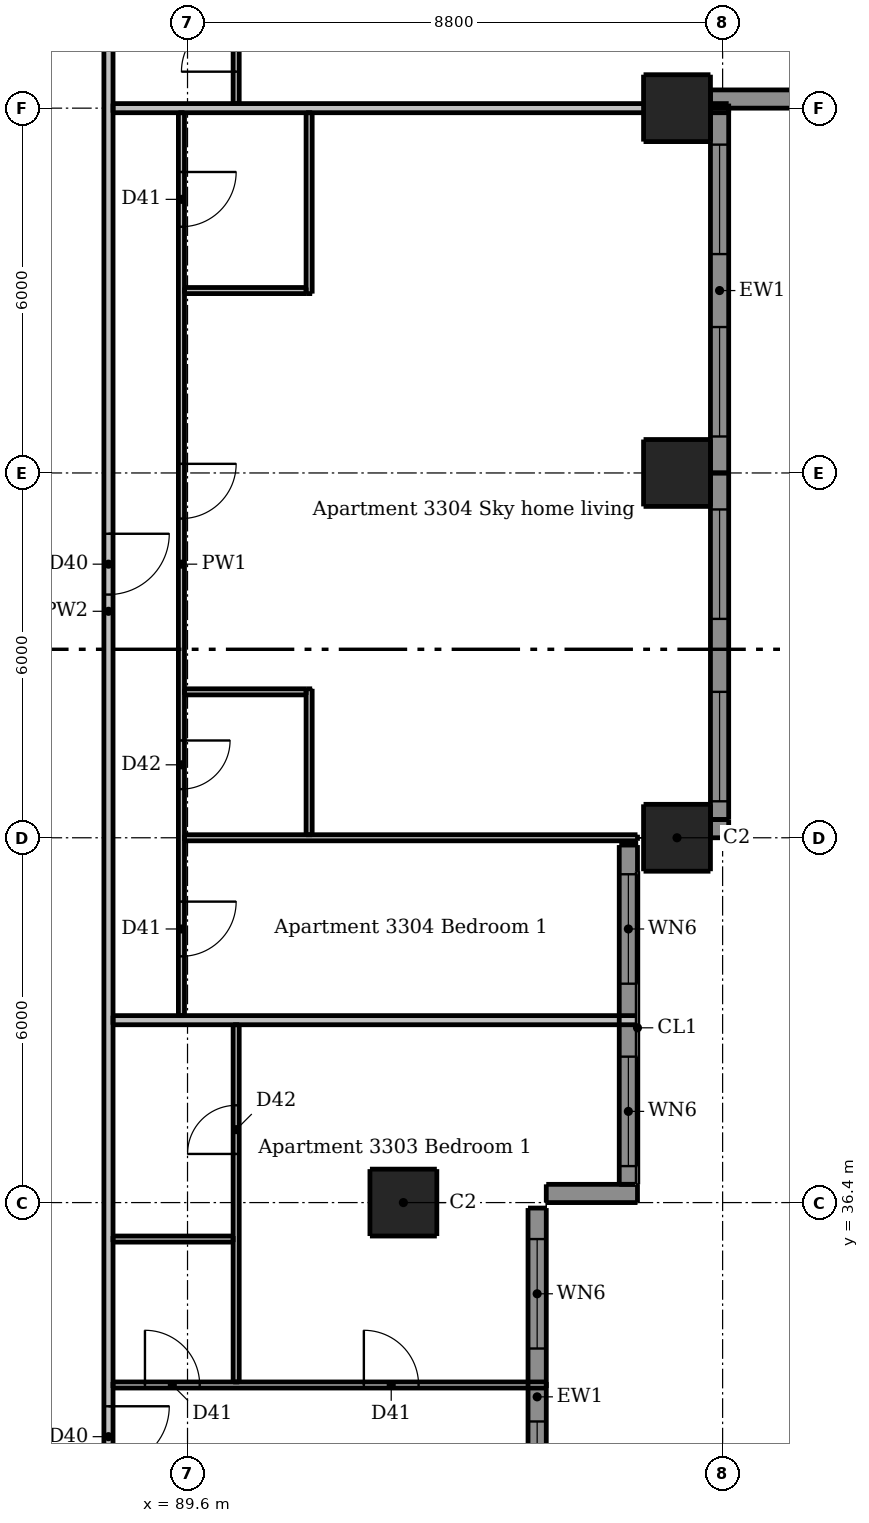
"""IFC4 building model, lengths in metres.
Left out: names, types, materials, properties, quantities, classifications, styles, units other than length and angle.
Written with IfcOpenShell. Run it as: python <this file> out.ifc"""

import sys

from ifc_helpers import new_model, si_unit, direction, frame, frame_2d, origin, origin_2d, place, context, subcontext, project, spatial, rectangle, extrude, element, fill, save


model = new_model("IFC4")
c1 = context("Model", 3, precision=1e-05, world=origin(), true_north=direction((0.0, 1.0)))
c2 = subcontext(c1, "Body", "Model", "MODEL_VIEW")
j1 = project(units=[si_unit("LENGTHUNIT", "METRE"), si_unit("PLANEANGLEUNIT", "RADIAN")], contexts=[c1])
p1 = place(None, origin())
s1 = spatial("IfcSite", under=j1, at=p1, CompositionType="ELEMENT")
p2 = place(p1, origin())
s2 = spatial("IfcBuilding", under=s1, at=p2, CompositionType="ELEMENT")
p3 = place(p2, frame((0.0, 0.0, 121.6)))
s3 = spatial("IfcBuildingStorey", under=s2, at=p3, CompositionType="ELEMENT", Elevation=121.6)
for number, where, z_axis, x_axis in (
    (1, (93.15, 36.4, 0.0), (0.0, 0.0, 1.0), (1.0, 0.0, 0.0)),
    (2, (97.65, 42.4, 0.0), (0.0, 0.0, 1.0), (1.0, 0.0, 0.0)),
    (3, (97.65, 48.4, 0.0), (0.0, 0.0, 1.0), (1.0, 0.0, 0.0)),
    (4, (97.65, 54.4, 0.0), (0.0, 0.0, 1.0), (1.0, 0.0, 0.0)),
):
    element("IfcColumn", number, at=place(p3, frame(where, z_axis=z_axis, x_axis=x_axis)), inside=s3, PredefinedType="COLUMN", context=c2, shape_type="SweptSolid", body=[
        extrude(rectangle(XDim=1.1, YDim=1.1, at=origin_2d()), origin(), (0.0, 0.0, 1.0), 2.95),
    ])
p4 = place(p3, frame((95.5, 36.55, 0.0), z_axis=(0.0, 0.0, 1.0), x_axis=(1.0, 0.0, 0.0)))
e5 = element("IfcWall", 5, at=p4, inside=s3, PredefinedType="SOLIDWALL", context=c2, shape_type="SweptSolid", body=[
    extrude(rectangle(XDim=1.5, YDim=0.3, at=frame_2d((0.75, 0.0))), origin(), (0.0, 0.0, 1.0), 2.95),
])
p5 = place(p3, frame((98.2, 42.55, 0.0), z_axis=(0.0, 0.0, 1.0), x_axis=(1.0, 0.0, 0.0)))
e6 = element("IfcWall", 6, at=p5, inside=s3, PredefinedType="SOLIDWALL", context=c2, shape_type="SweptSolid", body=[
    extrude(rectangle(XDim=0.3, YDim=0.3, at=frame_2d((0.15, 0.0))), origin(), (0.0, 0.0, 1.0), 2.95),
])
p6 = place(p3, frame((98.2, 54.55, 0.0), z_axis=(0.0, 0.0, 1.0), x_axis=(1.0, 0.0, 0.0)))
e7 = element("IfcWall", 7, at=p6, inside=s3, PredefinedType="SOLIDWALL", context=c2, shape_type="SweptSolid", body=[
    extrude(rectangle(XDim=1.8, YDim=0.3, at=frame_2d((0.9, 0.0))), origin(), (0.0, 0.0, 1.0), 2.95),
])
p7 = place(p3, frame((95.35, 30.1, 0.0), z_axis=(0.0, 0.0, 1.0), x_axis=(0.0, 1.0, 0.0)))
e8 = element("IfcWall", 8, at=p7, inside=s3, PredefinedType="SOLIDWALL", context=c2, shape_type="SweptSolid", body=[
    extrude(rectangle(XDim=6.21, YDim=0.3, at=frame_2d((3.105, 0.0))), origin(), (0.0, 0.0, 1.0), 2.34),
])
p8 = place(p7, frame((0.9, 0.0, 0.15)))
e9 = element("IfcOpeningElement", 9, at=p8, cuts=e8, PredefinedType="OPENING", context=c2, shape_type="SweptSolid", body=[
    extrude(rectangle(XDim=1.8, YDim=2.1, at=frame_2d((0.9, 1.05))), frame((0.0, 0.16, 0.0), z_axis=(0.0, -1.0, 0.0), x_axis=(1.0, 0.0, 0.0)), (0.0, 0.0, 1.0), 0.32),
])
p9 = place(p7, frame((3.9, 0.0, 0.15)))
e10 = element("IfcOpeningElement", 10, at=p9, cuts=e8, PredefinedType="OPENING", context=c2, shape_type="SweptSolid", body=[
    extrude(rectangle(XDim=1.8, YDim=2.1, at=frame_2d((0.9, 1.05))), frame((0.0, 0.16, 0.0), z_axis=(0.0, -1.0, 0.0), x_axis=(1.0, 0.0, 0.0)), (0.0, 0.0, 1.0), 0.32),
])
p10 = place(p3, frame((96.85, 36.7, 0.0), z_axis=(0.0, 0.0, 1.0), x_axis=(0.0, 1.0, 0.0)))
e11 = element("IfcWall", 11, at=p10, inside=s3, PredefinedType="SOLIDWALL", context=c2, shape_type="SweptSolid", body=[
    extrude(rectangle(XDim=5.58, YDim=0.3, at=frame_2d((2.79, 0.0))), origin(), (0.0, 0.0, 1.0), 2.34),
])
p11 = place(p10, frame((0.3, 0.0, 0.15)))
e12 = element("IfcOpeningElement", 12, at=p11, cuts=e11, PredefinedType="OPENING", context=c2, shape_type="SweptSolid", body=[
    extrude(rectangle(XDim=1.8, YDim=2.1, at=frame_2d((0.9, 1.05))), frame((0.0, 0.16, 0.0), z_axis=(0.0, -1.0, 0.0), x_axis=(1.0, 0.0, 0.0)), (0.0, 0.0, 1.0), 0.32),
])
p12 = place(p10, frame((3.3, 0.0, 0.15)))
e13 = element("IfcOpeningElement", 13, at=p12, cuts=e11, PredefinedType="OPENING", context=c2, shape_type="SweptSolid", body=[
    extrude(rectangle(XDim=1.8, YDim=2.1, at=frame_2d((0.9, 1.05))), frame((0.0, 0.16, 0.0), z_axis=(0.0, -1.0, 0.0), x_axis=(1.0, 0.0, 0.0)), (0.0, 0.0, 1.0), 0.32),
])
p13 = place(p3, frame((98.35, 42.7, 0.0), z_axis=(0.0, 0.0, 1.0), x_axis=(0.0, 1.0, 0.0)))
e14 = element("IfcWall", 14, at=p13, inside=s3, PredefinedType="SOLIDWALL", context=c2, shape_type="SweptSolid", body=[
    extrude(rectangle(XDim=5.7, YDim=0.3, at=frame_2d((2.85, 0.0))), origin(), (0.0, 0.0, 1.0), 2.34),
])
p14 = place(p13, frame((0.3, 0.0, 0.15)))
e15 = element("IfcOpeningElement", 15, at=p14, cuts=e14, PredefinedType="OPENING", context=c2, shape_type="SweptSolid", body=[
    extrude(rectangle(XDim=1.8, YDim=2.1, at=frame_2d((0.9, 1.05))), frame((0.0, 0.16, 0.0), z_axis=(0.0, -1.0, 0.0), x_axis=(1.0, 0.0, 0.0)), (0.0, 0.0, 1.0), 0.32),
])
p15 = place(p13, frame((3.3, 0.0, 0.15)))
e16 = element("IfcOpeningElement", 16, at=p15, cuts=e14, PredefinedType="OPENING", context=c2, shape_type="SweptSolid", body=[
    extrude(rectangle(XDim=1.8, YDim=2.1, at=frame_2d((0.9, 1.05))), frame((0.0, 0.16, 0.0), z_axis=(0.0, -1.0, 0.0), x_axis=(1.0, 0.0, 0.0)), (0.0, 0.0, 1.0), 0.32),
])
p16 = place(p3, frame((98.35, 48.4, 0.0), z_axis=(0.0, 0.0, 1.0), x_axis=(0.0, 1.0, 0.0)))
e17 = element("IfcWall", 17, at=p16, inside=s3, PredefinedType="SOLIDWALL", context=c2, shape_type="SweptSolid", body=[
    extrude(rectangle(XDim=6.0, YDim=0.3, at=frame_2d((3.0, 0.0))), origin(), (0.0, 0.0, 1.0), 2.34),
])
p17 = place(p16, frame((0.6, 0.0, 0.15)))
e18 = element("IfcOpeningElement", 18, at=p17, cuts=e17, PredefinedType="OPENING", context=c2, shape_type="SweptSolid", body=[
    extrude(rectangle(XDim=1.8, YDim=2.1, at=frame_2d((0.9, 1.05))), frame((0.0, 0.16, 0.0), z_axis=(0.0, -1.0, 0.0), x_axis=(1.0, 0.0, 0.0)), (0.0, 0.0, 1.0), 0.32),
])
p18 = place(p16, frame((3.6, 0.0, 0.15)))
e19 = element("IfcOpeningElement", 19, at=p18, cuts=e17, PredefinedType="OPENING", context=c2, shape_type="SweptSolid", body=[
    extrude(rectangle(XDim=1.8, YDim=2.1, at=frame_2d((0.9, 1.05))), frame((0.0, 0.16, 0.0), z_axis=(0.0, -1.0, 0.0), x_axis=(1.0, 0.0, 0.0)), (0.0, 0.0, 1.0), 0.32),
])
p19 = place(p3, frame((89.5, 54.325, 0.0), z_axis=(0.0, 0.0, 1.0), x_axis=(0.0, -1.0, 0.0)))
e20 = element("IfcWall", 20, at=p19, inside=s3, PredefinedType="PARTITIONING", context=c2, shape_type="SweptSolid", body=[
    extrude(rectangle(XDim=14.85, YDim=0.1, at=frame_2d((7.425, 0.0))), origin(), (0.0, 0.0, 1.0), 2.95),
])
p20 = place(p19, frame((5.775, 0.0, 0.0)))
e21 = element("IfcOpeningElement", 21, at=p20, cuts=e20, PredefinedType="OPENING", context=c2, shape_type="SweptSolid", body=[
    extrude(rectangle(XDim=0.9, YDim=2.1, at=frame_2d((0.45, 1.05))), frame((0.0, 0.06, 0.0), z_axis=(0.0, -1.0, 0.0), x_axis=(1.0, 0.0, 0.0)), (0.0, 0.0, 1.0), 0.12),
])
p21 = place(p19, frame((0.975, 0.0, 0.0)))
e22 = element("IfcOpeningElement", 22, at=p21, cuts=e20, PredefinedType="OPENING", context=c2, shape_type="SweptSolid", body=[
    extrude(rectangle(XDim=0.9, YDim=2.1, at=frame_2d((0.45, 1.05))), frame((0.0, 0.06, 0.0), z_axis=(0.0, -1.0, 0.0), x_axis=(1.0, 0.0, 0.0)), (0.0, 0.0, 1.0), 0.12),
])
p22 = place(p19, frame((12.975, 0.0, 0.0)))
e23 = element("IfcOpeningElement", 23, at=p22, cuts=e20, PredefinedType="OPENING", context=c2, shape_type="SweptSolid", body=[
    extrude(rectangle(XDim=0.9, YDim=2.1, at=frame_2d((0.45, 1.05))), frame((0.0, 0.06, 0.0), z_axis=(0.0, -1.0, 0.0), x_axis=(1.0, 0.0, 0.0)), (0.0, 0.0, 1.0), 0.12),
])
p23 = place(p19, frame((10.325, 0.0, 0.0)))
e24 = element("IfcOpeningElement", 24, at=p23, cuts=e20, PredefinedType="OPENING", context=c2, shape_type="SweptSolid", body=[
    extrude(rectangle(XDim=0.8, YDim=2.1, at=frame_2d((0.4, 1.05))), frame((0.0, 0.06, 0.0), z_axis=(0.0, -1.0, 0.0), x_axis=(1.0, 0.0, 0.0)), (0.0, 0.0, 1.0), 0.12),
])
p24 = place(p3, frame((90.4, 33.45, 0.0), z_axis=(0.0, 0.0, 1.0), x_axis=(0.0, 1.0, 0.0)))
e25 = element("IfcWall", 25, at=p24, inside=s3, PredefinedType="PARTITIONING", context=c2, shape_type="SweptSolid", body=[
    extrude(rectangle(XDim=5.875, YDim=0.1, at=frame_2d((2.938, 0.0))), origin(), (0.0, 0.0, 1.0), 2.95),
])
p25 = place(p24, frame((3.75, 0.0, 0.0)))
e26 = element("IfcOpeningElement", 26, at=p25, cuts=e25, PredefinedType="OPENING", context=c2, shape_type="SweptSolid", body=[
    extrude(rectangle(XDim=0.8, YDim=2.1, at=frame_2d((0.4, 1.05))), frame((0.0, 0.06, 0.0), z_axis=(0.0, -1.0, 0.0), x_axis=(1.0, 0.0, 0.0)), (0.0, 0.0, 1.0), 0.12),
])
p26 = place(p3, frame((90.4, 54.475, 0.0), z_axis=(0.0, 0.0, 1.0), x_axis=(0.0, 1.0, 0.0)))
e27 = element("IfcWall", 27, at=p26, inside=s3, PredefinedType="PARTITIONING", context=c2, shape_type="SweptSolid", body=[
    extrude(rectangle(XDim=2.075, YDim=0.1, at=frame_2d((1.038, 0.0))), origin(), (0.0, 0.0, 1.0), 2.95),
])
p27 = place(p26, frame((0.525, 0.0, 0.0)))
e28 = element("IfcOpeningElement", 28, at=p27, cuts=e27, PredefinedType="OPENING", context=c2, shape_type="SweptSolid", body=[
    extrude(rectangle(XDim=0.9, YDim=2.1, at=frame_2d((0.45, 1.05))), frame((0.0, 0.06, 0.0), z_axis=(0.0, -1.0, 0.0), x_axis=(1.0, 0.0, 0.0)), (0.0, 0.0, 1.0), 0.12),
])
p28 = place(p3, frame((91.6, 42.45, 0.0), z_axis=(0.0, 0.0, 1.0), x_axis=(0.0, 1.0, 0.0)))
e29 = element("IfcWall", 29, at=p28, inside=s3, PredefinedType="PARTITIONING", context=c2, shape_type="SweptSolid", body=[
    extrude(rectangle(XDim=2.4, YDim=0.1, at=frame_2d((1.2, 0.0))), origin(), (0.0, 0.0, 1.0), 2.95),
])
p29 = place(p3, frame((91.6, 51.35, 0.0), z_axis=(0.0, 0.0, 1.0), x_axis=(0.0, 1.0, 0.0)))
e30 = element("IfcWall", 30, at=p29, inside=s3, PredefinedType="PARTITIONING", context=c2, shape_type="SweptSolid", body=[
    extrude(rectangle(XDim=2.975, YDim=0.1, at=frame_2d((1.487, 0.0))), origin(), (0.0, 0.0, 1.0), 2.95),
])
for number, where, z_axis, x_axis in (
    (31, (89.55, 51.4, 0.0), (0.0, 0.0, 1.0), (1.0, 0.0, 0.0)),
    (32, (89.55, 44.8, 0.0), (0.0, 0.0, 1.0), (1.0, 0.0, 0.0)),
):
    element("IfcWall", number, at=place(p3, frame(where, z_axis=z_axis, x_axis=x_axis)), inside=s3, PredefinedType="PARTITIONING", context=c2, shape_type="SweptSolid", body=[
        extrude(rectangle(XDim=2.0, YDim=0.1, at=frame_2d((1.0, 0.0))), origin(), (0.0, 0.0, 1.0), 2.95),
    ])
p30 = place(p3, frame((89.55, 42.4, 0.0), z_axis=(0.0, 0.0, 1.0), x_axis=(1.0, 0.0, 0.0)))
e33 = element("IfcWall", 33, at=p30, inside=s3, PredefinedType="PARTITIONING", context=c2, shape_type="SweptSolid", body=[
    extrude(rectangle(XDim=7.45, YDim=0.1, at=frame_2d((3.725, 0.0))), origin(), (0.0, 0.0, 1.0), 2.332),
])
p31 = place(p3, frame((88.375, 35.8, 0.0), z_axis=(0.0, 0.0, 1.0), x_axis=(1.0, 0.0, 0.0)))
e34 = element("IfcWall", 34, at=p31, inside=s3, PredefinedType="PARTITIONING", context=c2, shape_type="SweptSolid", body=[
    extrude(rectangle(XDim=1.975, YDim=0.1, at=frame_2d((0.988, 0.0))), origin(), (0.0, 0.0, 1.0), 2.95),
])
p32 = place(p3, frame((88.375, 33.4, 0.0), z_axis=(0.0, 0.0, 1.0), x_axis=(1.0, 0.0, 0.0)))
e35 = element("IfcWall", 35, at=p32, inside=s3, PredefinedType="PARTITIONING", context=c2, shape_type="SweptSolid", body=[
    extrude(rectangle(XDim=7.125, YDim=0.1, at=frame_2d((3.562, 0.0))), origin(), (0.0, 0.0, 1.0), 2.95),
])
p33 = place(p32, frame((0.525, 0.0, 0.0)))
e36 = element("IfcOpeningElement", 36, at=p33, cuts=e35, PredefinedType="OPENING", context=c2, shape_type="SweptSolid", body=[
    extrude(rectangle(XDim=0.9, YDim=2.1, at=frame_2d((0.45, 1.05))), frame((0.0, 0.06, 0.0), z_axis=(0.0, -1.0, 0.0), x_axis=(1.0, 0.0, 0.0)), (0.0, 0.0, 1.0), 0.12),
])
p34 = place(p32, frame((4.125, 0.0, 0.0)))
e37 = element("IfcOpeningElement", 37, at=p34, cuts=e35, PredefinedType="OPENING", context=c2, shape_type="SweptSolid", body=[
    extrude(rectangle(XDim=0.9, YDim=2.1, at=frame_2d((0.45, 1.05))), frame((0.0, 0.06, 0.0), z_axis=(0.0, -1.0, 0.0), x_axis=(1.0, 0.0, 0.0)), (0.0, 0.0, 1.0), 0.12),
])
p35 = place(p3, frame((88.3, 60.475, 0.0), z_axis=(0.0, 0.0, 1.0), x_axis=(0.0, -1.0, 0.0)))
e38 = element("IfcWall", 38, at=p35, inside=s3, PredefinedType="PARTITIONING", context=c2, shape_type="SweptSolid", body=[
    extrude(rectangle(XDim=28.7, YDim=0.15, at=frame_2d((14.35, 0.0))), origin(), (0.0, 0.0, 1.0), 2.95),
])
p36 = place(p35, frame((27.425, 0.0, 0.0)))
e39 = element("IfcOpeningElement", 39, at=p36, cuts=e38, PredefinedType="OPENING", context=c2, shape_type="SweptSolid", body=[
    extrude(rectangle(XDim=1.0, YDim=2.1, at=frame_2d((0.5, 1.05))), frame((0.0, 0.085, 0.0), z_axis=(0.0, -1.0, 0.0), x_axis=(1.0, 0.0, 0.0)), (0.0, 0.0, 1.0), 0.17),
])
p37 = place(p35, frame((13.075, 0.0, 0.0)))
e40 = element("IfcOpeningElement", 40, at=p37, cuts=e38, PredefinedType="OPENING", context=c2, shape_type="SweptSolid", body=[
    extrude(rectangle(XDim=1.0, YDim=2.1, at=frame_2d((0.5, 1.05))), frame((0.0, 0.085, 0.0), z_axis=(0.0, -1.0, 0.0), x_axis=(1.0, 0.0, 0.0)), (0.0, 0.0, 1.0), 0.17),
])
p38 = place(p35, frame((2.575, 0.0, 0.0)))
e41 = element("IfcOpeningElement", 41, at=p38, cuts=e38, PredefinedType="OPENING", context=c2, shape_type="SweptSolid", body=[
    extrude(rectangle(XDim=1.0, YDim=2.1, at=frame_2d((0.5, 1.05))), frame((0.0, 0.085, 0.0), z_axis=(0.0, -1.0, 0.0), x_axis=(1.0, 0.0, 0.0)), (0.0, 0.0, 1.0), 0.17),
])
p39 = place(p3, frame((88.375, 54.4, 0.0), z_axis=(0.0, 0.0, 1.0), x_axis=(1.0, 0.0, 0.0)))
e42 = element("IfcWall", 42, at=p39, inside=s3, PredefinedType="PARTITIONING", context=c2, shape_type="SweptSolid", body=[
    extrude(rectangle(XDim=10.125, YDim=0.15, at=frame_2d((5.062, 0.0))), origin(), (0.0, 0.0, 1.0), 2.332),
])
p40 = place(p3, frame((88.375, 39.4, 0.0), z_axis=(0.0, 0.0, 1.0), x_axis=(1.0, 0.0, 0.0)))
e43 = element("IfcWall", 43, at=p40, inside=s3, PredefinedType="PARTITIONING", context=c2, shape_type="SweptSolid", body=[
    extrude(rectangle(XDim=8.625, YDim=0.15, at=frame_2d((4.312, 0.0))), origin(), (0.0, 0.0, 1.0), 2.95),
])
p41 = place(p8, origin())
e44 = element("IfcWindow", 44, at=p41, inside=s3, PartitioningType="DOUBLE_PANEL_VERTICAL", PredefinedType="WINDOW", context=c2, shape_type="SweptSolid", body=[
    extrude(rectangle(XDim=1.8, YDim=2.1, at=frame_2d((0.9, 1.05))), frame((0.0, 0.03, 0.0), z_axis=(0.0, -1.0, 0.0), x_axis=(1.0, 0.0, 0.0)), (0.0, 0.0, 1.0), 0.06),
])
fill(e9, e44)
p42 = place(p9, origin())
e45 = element("IfcWindow", 45, at=p42, inside=s3, PartitioningType="DOUBLE_PANEL_VERTICAL", PredefinedType="WINDOW", context=c2, shape_type="SweptSolid", body=[
    extrude(rectangle(XDim=1.8, YDim=2.1, at=frame_2d((0.9, 1.05))), frame((0.0, 0.03, 0.0), z_axis=(0.0, -1.0, 0.0), x_axis=(1.0, 0.0, 0.0)), (0.0, 0.0, 1.0), 0.06),
])
fill(e10, e45)
p43 = place(p11, origin())
e46 = element("IfcWindow", 46, at=p43, inside=s3, PartitioningType="DOUBLE_PANEL_VERTICAL", PredefinedType="WINDOW", context=c2, shape_type="SweptSolid", body=[
    extrude(rectangle(XDim=1.8, YDim=2.1, at=frame_2d((0.9, 1.05))), frame((0.0, 0.03, 0.0), z_axis=(0.0, -1.0, 0.0), x_axis=(1.0, 0.0, 0.0)), (0.0, 0.0, 1.0), 0.06),
])
fill(e12, e46)
p44 = place(p12, origin())
e47 = element("IfcWindow", 47, at=p44, inside=s3, PartitioningType="DOUBLE_PANEL_VERTICAL", PredefinedType="WINDOW", context=c2, shape_type="SweptSolid", body=[
    extrude(rectangle(XDim=1.8, YDim=2.1, at=frame_2d((0.9, 1.05))), frame((0.0, 0.03, 0.0), z_axis=(0.0, -1.0, 0.0), x_axis=(1.0, 0.0, 0.0)), (0.0, 0.0, 1.0), 0.06),
])
fill(e13, e47)
p45 = place(p14, origin())
e48 = element("IfcWindow", 48, at=p45, inside=s3, PartitioningType="DOUBLE_PANEL_VERTICAL", PredefinedType="WINDOW", context=c2, shape_type="SweptSolid", body=[
    extrude(rectangle(XDim=1.8, YDim=2.1, at=frame_2d((0.9, 1.05))), frame((0.0, 0.03, 0.0), z_axis=(0.0, -1.0, 0.0), x_axis=(1.0, 0.0, 0.0)), (0.0, 0.0, 1.0), 0.06),
])
fill(e15, e48)
p46 = place(p15, origin())
e49 = element("IfcWindow", 49, at=p46, inside=s3, PartitioningType="DOUBLE_PANEL_VERTICAL", PredefinedType="WINDOW", context=c2, shape_type="SweptSolid", body=[
    extrude(rectangle(XDim=1.8, YDim=2.1, at=frame_2d((0.9, 1.05))), frame((0.0, 0.03, 0.0), z_axis=(0.0, -1.0, 0.0), x_axis=(1.0, 0.0, 0.0)), (0.0, 0.0, 1.0), 0.06),
])
fill(e16, e49)
p47 = place(p17, origin())
e50 = element("IfcWindow", 50, at=p47, inside=s3, PartitioningType="DOUBLE_PANEL_VERTICAL", PredefinedType="WINDOW", context=c2, shape_type="SweptSolid", body=[
    extrude(rectangle(XDim=1.8, YDim=2.1, at=frame_2d((0.9, 1.05))), frame((0.0, 0.03, 0.0), z_axis=(0.0, -1.0, 0.0), x_axis=(1.0, 0.0, 0.0)), (0.0, 0.0, 1.0), 0.06),
])
fill(e18, e50)
p48 = place(p18, origin())
e51 = element("IfcWindow", 51, at=p48, inside=s3, PartitioningType="DOUBLE_PANEL_VERTICAL", PredefinedType="WINDOW", context=c2, shape_type="SweptSolid", body=[
    extrude(rectangle(XDim=1.8, YDim=2.1, at=frame_2d((0.9, 1.05))), frame((0.0, 0.03, 0.0), z_axis=(0.0, -1.0, 0.0), x_axis=(1.0, 0.0, 0.0)), (0.0, 0.0, 1.0), 0.06),
])
fill(e19, e51)
p49 = place(p36, origin())
e52 = element("IfcDoor", 52, at=p49, inside=s3, OperationType="SINGLE_SWING_LEFT", PredefinedType="DOOR", context=c2, shape_type="SweptSolid", body=[
    extrude(rectangle(XDim=1.0, YDim=2.1, at=frame_2d((0.5, 1.05))), frame((0.0, 0.025, 0.0), z_axis=(0.0, -1.0, 0.0), x_axis=(1.0, 0.0, 0.0)), (0.0, 0.0, 1.0), 0.05),
])
fill(e39, e52)
p50 = place(p33, origin())
e53 = element("IfcDoor", 53, at=p50, inside=s3, OperationType="SINGLE_SWING_LEFT", PredefinedType="DOOR", context=c2, shape_type="SweptSolid", body=[
    extrude(rectangle(XDim=0.9, YDim=2.1, at=frame_2d((0.45, 1.05))), frame((0.0, 0.025, 0.0), z_axis=(0.0, -1.0, 0.0), x_axis=(1.0, 0.0, 0.0)), (0.0, 0.0, 1.0), 0.05),
])
fill(e36, e53)
p51 = place(p34, origin())
e54 = element("IfcDoor", 54, at=p51, inside=s3, OperationType="SINGLE_SWING_LEFT", PredefinedType="DOOR", context=c2, shape_type="SweptSolid", body=[
    extrude(rectangle(XDim=0.9, YDim=2.1, at=frame_2d((0.45, 1.05))), frame((0.0, 0.025, 0.0), z_axis=(0.0, -1.0, 0.0), x_axis=(1.0, 0.0, 0.0)), (0.0, 0.0, 1.0), 0.05),
])
fill(e37, e54)
p52 = place(p25, origin())
e55 = element("IfcDoor", 55, at=p52, inside=s3, OperationType="SINGLE_SWING_LEFT", PredefinedType="DOOR", context=c2, shape_type="SweptSolid", body=[
    extrude(rectangle(XDim=0.8, YDim=2.1, at=frame_2d((0.4, 1.05))), frame((0.0, 0.025, 0.0), z_axis=(0.0, -1.0, 0.0), x_axis=(1.0, 0.0, 0.0)), (0.0, 0.0, 1.0), 0.05),
])
fill(e26, e55)
p53 = place(p37, origin())
e56 = element("IfcDoor", 56, at=p53, inside=s3, OperationType="SINGLE_SWING_LEFT", PredefinedType="DOOR", context=c2, shape_type="SweptSolid", body=[
    extrude(rectangle(XDim=1.0, YDim=2.1, at=frame_2d((0.5, 1.05))), frame((0.0, 0.025, 0.0), z_axis=(0.0, -1.0, 0.0), x_axis=(1.0, 0.0, 0.0)), (0.0, 0.0, 1.0), 0.05),
])
fill(e40, e56)
p54 = place(p20, origin())
e57 = element("IfcDoor", 57, at=p54, inside=s3, OperationType="SINGLE_SWING_LEFT", PredefinedType="DOOR", context=c2, shape_type="SweptSolid", body=[
    extrude(rectangle(XDim=0.9, YDim=2.1, at=frame_2d((0.45, 1.05))), frame((0.0, 0.025, 0.0), z_axis=(0.0, -1.0, 0.0), x_axis=(1.0, 0.0, 0.0)), (0.0, 0.0, 1.0), 0.05),
])
fill(e21, e57)
p55 = place(p21, origin())
e58 = element("IfcDoor", 58, at=p55, inside=s3, OperationType="SINGLE_SWING_LEFT", PredefinedType="DOOR", context=c2, shape_type="SweptSolid", body=[
    extrude(rectangle(XDim=0.9, YDim=2.1, at=frame_2d((0.45, 1.05))), frame((0.0, 0.025, 0.0), z_axis=(0.0, -1.0, 0.0), x_axis=(1.0, 0.0, 0.0)), (0.0, 0.0, 1.0), 0.05),
])
fill(e22, e58)
p56 = place(p22, origin())
e59 = element("IfcDoor", 59, at=p56, inside=s3, OperationType="SINGLE_SWING_LEFT", PredefinedType="DOOR", context=c2, shape_type="SweptSolid", body=[
    extrude(rectangle(XDim=0.9, YDim=2.1, at=frame_2d((0.45, 1.05))), frame((0.0, 0.025, 0.0), z_axis=(0.0, -1.0, 0.0), x_axis=(1.0, 0.0, 0.0)), (0.0, 0.0, 1.0), 0.05),
])
fill(e23, e59)
p57 = place(p23, origin())
e60 = element("IfcDoor", 60, at=p57, inside=s3, OperationType="SINGLE_SWING_LEFT", PredefinedType="DOOR", context=c2, shape_type="SweptSolid", body=[
    extrude(rectangle(XDim=0.8, YDim=2.1, at=frame_2d((0.4, 1.05))), frame((0.0, 0.025, 0.0), z_axis=(0.0, -1.0, 0.0), x_axis=(1.0, 0.0, 0.0)), (0.0, 0.0, 1.0), 0.05),
])
fill(e24, e60)
p58 = place(p27, origin())
e61 = element("IfcDoor", 61, at=p58, inside=s3, OperationType="SINGLE_SWING_LEFT", PredefinedType="DOOR", context=c2, shape_type="SweptSolid", body=[
    extrude(rectangle(XDim=0.9, YDim=2.1, at=frame_2d((0.45, 1.05))), frame((0.0, 0.025, 0.0), z_axis=(0.0, -1.0, 0.0), x_axis=(1.0, 0.0, 0.0)), (0.0, 0.0, 1.0), 0.05),
])
fill(e28, e61)
save(model, sys.argv[1])
